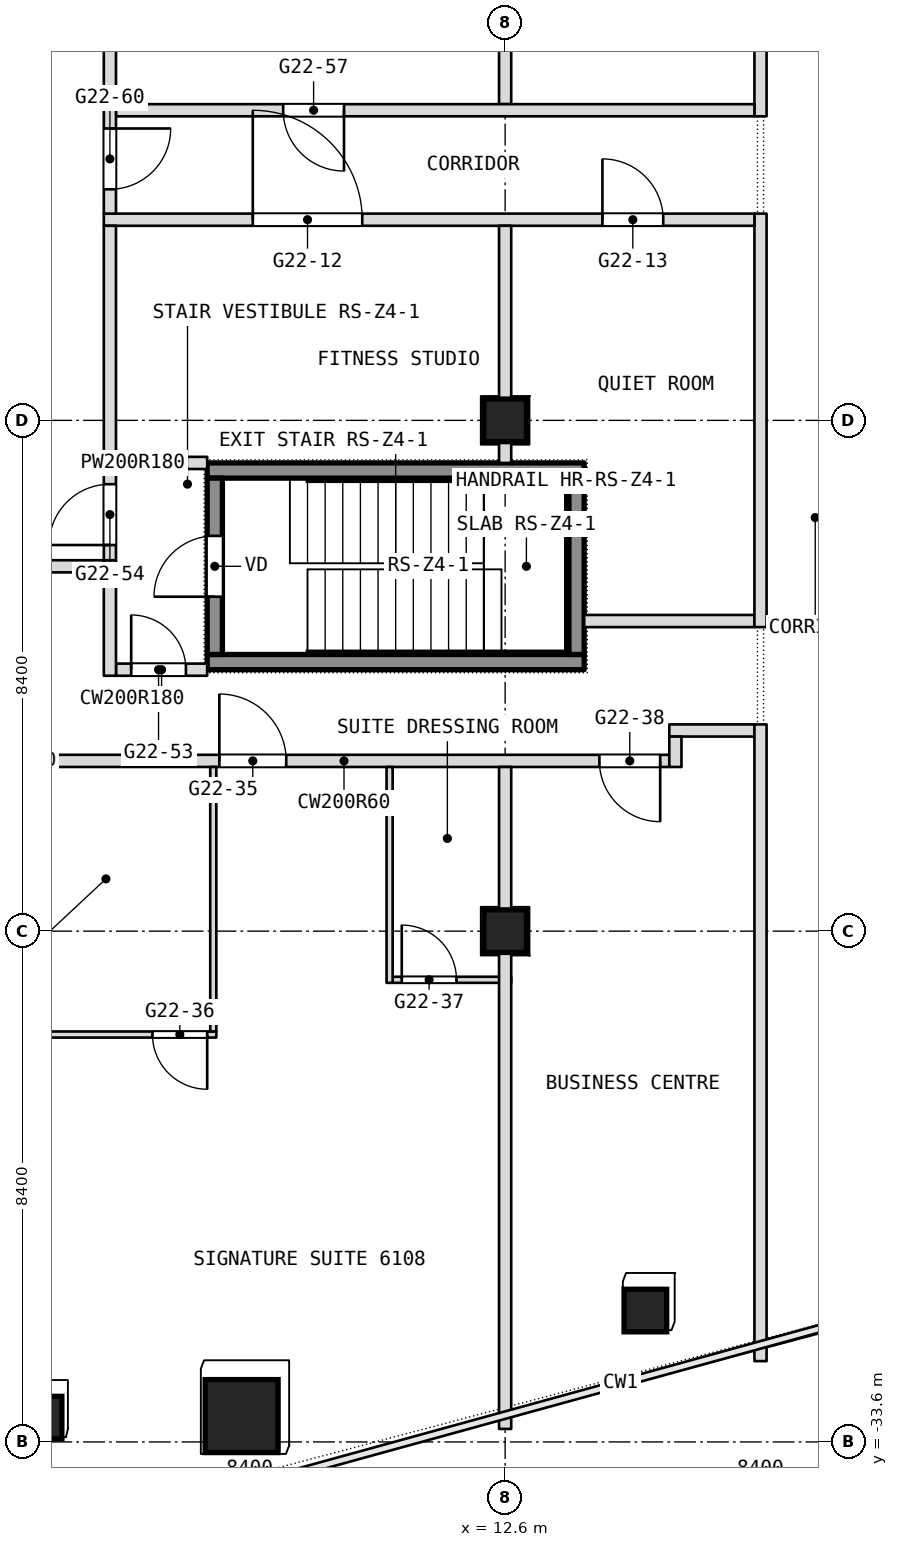
"""IFC4 building model, lengths in metres.
Left out: names, types, materials, properties, quantities, classifications, styles, units other than length and angle.
Written with IfcOpenShell. Run it as: python <this file> out.ifc"""

import sys

from ifc_helpers import new_model, si_unit, direction, frame, frame_2d, origin, origin_2d, place, context, subcontext, project, spatial, rectangle, extrude, element, fill, save


model = new_model("IFC4")
c1 = context("Model", 3, precision=1e-05, world=origin(), true_north=direction((0.0, 1.0)))
c2 = subcontext(c1, "Body", "Model", "MODEL_VIEW")
j1 = project(units=[si_unit("LENGTHUNIT", "METRE"), si_unit("PLANEANGLEUNIT", "RADIAN")], contexts=[c1])
p1 = place(None, origin())
s1 = spatial("IfcSite", under=j1, at=p1, CompositionType="ELEMENT")
p2 = place(p1, origin())
s2 = spatial("IfcBuilding", under=s1, at=p2, CompositionType="ELEMENT")
p3 = place(p2, frame((0.0, 0.0, 266.9)))
s3 = spatial("IfcBuildingStorey", under=s2, at=p3, CompositionType="ELEMENT", Elevation=266.9)
p4 = place(p3, frame((8.266, -33.175, 0.0), z_axis=(0.0, 0.0, 1.0), x_axis=(1.0, 0.0, 0.0)))
e1 = element("IfcColumn", 1, at=p4, inside=s3, PredefinedType="COLUMN", context=c2, shape_type="SweptSolid", body=[
    extrude(rectangle(XDim=1.2, YDim=1.2, at=origin_2d()), origin(), (0.0, 0.0, 1.0), 3.6),
])
for number, where, z_axis, x_axis in (
    (2, (12.6, -25.2, 0.0), (0.0, 0.0, 1.0), (1.0, 0.0, 0.0)),
    (3, (12.6, -16.8, 0.0), (0.0, 0.0, 1.0), (1.0, 0.0, 0.0)),
    (4, (14.907, -31.439, 0.0), (0.0, 0.0, 1.0), (1.0, 0.0, 0.0)),
    (5, (4.96, -33.2, 0.0), (0.0, 0.0, 1.0), (1.0, 0.0, 0.0)),
):
    element("IfcColumn", number, at=place(p3, frame(where, z_axis=z_axis, x_axis=x_axis)), inside=s3, PredefinedType="COLUMN", context=c2, shape_type="SweptSolid", body=[
        extrude(rectangle(XDim=0.7, YDim=0.7, at=origin_2d()), origin(), (0.0, 0.0, 1.0), 3.6),
    ])
p5 = place(p3, frame((4.3, -26.9, 0.0), z_axis=(0.0, 0.0, 1.0), x_axis=(1.0, 0.0, 0.0)))
e6 = element("IfcWall", 6, at=p5, inside=s3, PredefinedType="PARTITIONING", context=c2, shape_type="SweptSolid", body=[
    extrude(rectangle(XDim=3.55, YDim=0.1, at=frame_2d((1.775, 0.0))), origin(), (0.0, 0.0, 1.0), 3.34),
])
p6 = place(p5, frame((2.5, 0.0, 0.0)))
e7 = element("IfcOpeningElement", 7, at=p6, cuts=e6, PredefinedType="OPENING", context=c2, shape_type="SweptSolid", body=[
    extrude(rectangle(XDim=0.9, YDim=2.1, at=frame_2d((0.45, 1.05))), frame((0.0, 0.05, 0.0), z_axis=(0.0, -1.0, 0.0), x_axis=(1.0, 0.0, 0.0)), (0.0, 0.0, 1.0), 0.1),
])
p7 = place(p3, frame((10.75, -26.0, 0.0), z_axis=(0.0, 0.0, 1.0), x_axis=(1.0, 0.0, 0.0)))
e8 = element("IfcWall", 8, at=p7, inside=s3, PredefinedType="PARTITIONING", context=c2, shape_type="SweptSolid", body=[
    extrude(rectangle(XDim=1.95, YDim=0.1, at=frame_2d((0.975, 0.0))), origin(), (0.0, 0.0, 1.0), 3.34),
])
p8 = place(p7, frame((0.15, 0.0, 0.0)))
e9 = element("IfcOpeningElement", 9, at=p8, cuts=e8, PredefinedType="OPENING", context=c2, shape_type="SweptSolid", body=[
    extrude(rectangle(XDim=0.9, YDim=2.1, at=frame_2d((0.45, 1.05))), frame((0.0, 0.05, 0.0), z_axis=(0.0, -1.0, 0.0), x_axis=(1.0, 0.0, 0.0)), (0.0, 0.0, 1.0), 0.1),
])
p9 = place(p3, frame((4.6, -22.4, 0.0), z_axis=(0.0, 0.0, 1.0), x_axis=(1.0, 0.0, 0.0)))
e10 = element("IfcWall", 10, at=p9, inside=s3, PredefinedType="PARTITIONING", context=c2, shape_type="SweptSolid", body=[
    extrude(rectangle(XDim=10.7, YDim=0.2, at=frame_2d((5.35, 0.0))), origin(), (0.0, 0.0, 1.0), 3.34),
])
p10 = place(p9, frame((3.3, 0.0, 0.0)))
e11 = element("IfcOpeningElement", 11, at=p10, cuts=e10, PredefinedType="OPENING", context=c2, shape_type="SweptSolid", body=[
    extrude(rectangle(XDim=1.1, YDim=2.1, at=frame_2d((0.55, 1.05))), frame((0.0, 0.1, 0.0), z_axis=(0.0, -1.0, 0.0), x_axis=(1.0, 0.0, 0.0)), (0.0, 0.0, 1.0), 0.2),
])
p11 = place(p9, frame((9.55, 0.0, 0.0)))
e12 = element("IfcOpeningElement", 12, at=p11, cuts=e10, PredefinedType="OPENING", context=c2, shape_type="SweptSolid", body=[
    extrude(rectangle(XDim=1.0, YDim=2.1, at=frame_2d((0.5, 1.05))), frame((0.0, 0.1, 0.0), z_axis=(0.0, -1.0, 0.0), x_axis=(1.0, 0.0, 0.0)), (0.0, 0.0, 1.0), 0.2),
])
p12 = place(p3, frame((15.3, -21.9, 0.0), z_axis=(0.0, 0.0, 1.0), x_axis=(1.0, 0.0, 0.0)))
e13 = element("IfcWall", 13, at=p12, inside=s3, PredefinedType="PARTITIONING", context=c2, shape_type="SweptSolid", body=[
    extrude(rectangle(XDim=1.4, YDim=0.2, at=frame_2d((0.7, 0.0))), origin(), (0.0, 0.0, 1.0), 3.34),
])
p13 = place(p3, frame((6.2, -20.9, 0.0), z_axis=(0.0, 0.0, 1.0), x_axis=(1.0, 0.0, 0.0)))
e14 = element("IfcWall", 14, at=p13, inside=s3, PredefinedType="PARTITIONING", context=c2, shape_type="SweptSolid", body=[
    extrude(rectangle(XDim=1.5, YDim=0.2, at=frame_2d((0.75, 0.0))), origin(), (0.0, 0.0, 1.0), 3.34),
])
p14 = place(p13, frame((0.25, 0.0, 0.0)))
e15 = element("IfcOpeningElement", 15, at=p14, cuts=e14, PredefinedType="OPENING", context=c2, shape_type="SweptSolid", body=[
    extrude(rectangle(XDim=0.9, YDim=2.1, at=frame_2d((0.45, 1.05))), frame((0.0, 0.1, 0.0), z_axis=(0.0, -1.0, 0.0), x_axis=(1.0, 0.0, 0.0)), (0.0, 0.0, 1.0), 0.2),
])
p15 = place(p3, frame((13.9, -20.1, 0.0), z_axis=(0.0, 0.0, 1.0), x_axis=(1.0, 0.0, 0.0)))
e16 = element("IfcWall", 16, at=p15, inside=s3, PredefinedType="PARTITIONING", context=c2, shape_type="SweptSolid", body=[
    extrude(rectangle(XDim=2.8, YDim=0.2, at=frame_2d((1.4, 0.0))), origin(), (0.0, 0.0, 1.0), 3.34),
])
p16 = place(p3, frame((4.6, -19.2, 0.0), z_axis=(0.0, 0.0, 1.0), x_axis=(1.0, 0.0, 0.0)))
e17 = element("IfcWall", 17, at=p16, inside=s3, PredefinedType="PARTITIONING", context=c2, shape_type="SweptSolid", body=[
    extrude(rectangle(XDim=1.4, YDim=0.2, at=frame_2d((0.7, 0.0))), origin(), (0.0, 0.0, 1.0), 3.34),
])
p17 = place(p3, frame((6.0, -17.5, 0.0), z_axis=(0.0, 0.0, 1.0), x_axis=(1.0, 0.0, 0.0)))
e18 = element("IfcWall", 18, at=p17, inside=s3, PredefinedType="PARTITIONING", context=c2, shape_type="SweptSolid", body=[
    extrude(rectangle(XDim=1.7, YDim=0.2, at=frame_2d((0.85, 0.0))), origin(), (0.0, 0.0, 1.0), 3.34),
])
p18 = place(p3, frame((16.8, -32.271, 0.0), z_axis=(0.0, 0.0, 1.0), x_axis=(0.0, 1.0, 0.0)))
e19 = element("IfcWall", 19, at=p18, inside=s3, PredefinedType="PARTITIONING", context=c2, shape_type="SweptSolid", body=[
    extrude(rectangle(XDim=10.471, YDim=0.2, at=frame_2d((5.235, 0.0))), origin(), (0.0, 0.0, 1.0), 3.34),
])
p19 = place(p3, frame((16.8, -20.2, 0.0), z_axis=(0.0, 0.0, 1.0), x_axis=(0.0, 1.0, 0.0)))
e20 = element("IfcWall", 20, at=p19, inside=s3, PredefinedType="PARTITIONING", context=c2, shape_type="SweptSolid", body=[
    extrude(rectangle(XDim=6.8, YDim=0.2, at=frame_2d((3.4, 0.0))), origin(), (0.0, 0.0, 1.0), 3.34),
])
p20 = place(p3, frame((16.8, -11.8, 0.0), z_axis=(0.0, 0.0, 1.0), x_axis=(0.0, 1.0, 0.0)))
e21 = element("IfcWall", 21, at=p20, inside=s3, PredefinedType="PARTITIONING", context=c2, shape_type="SweptSolid", body=[
    extrude(rectangle(XDim=9.9, YDim=0.2, at=frame_2d((4.95, 0.0))), origin(), (0.0, 0.0, 1.0), 3.34),
])
p21 = place(p3, frame((15.4, -22.5, 0.0), z_axis=(0.0, 0.0, 1.0), x_axis=(0.0, 1.0, 0.0)))
e22 = element("IfcWall", 22, at=p21, inside=s3, PredefinedType="PARTITIONING", context=c2, shape_type="SweptSolid", body=[
    extrude(rectangle(XDim=0.5, YDim=0.2, at=frame_2d((0.25, 0.0))), origin(), (0.0, 0.0, 1.0), 3.34),
])
p22 = place(p3, frame((6.0, -13.5, 0.0), z_axis=(0.0, 0.0, 1.0), x_axis=(1.0, 0.0, 0.0)))
e23 = element("IfcWall", 23, at=p22, inside=s3, PredefinedType="PARTITIONING", context=c2, shape_type="SweptSolid", body=[
    extrude(rectangle(XDim=10.7, YDim=0.2, at=frame_2d((5.35, 0.0))), origin(), (0.0, 0.0, 1.0), 3.34),
])
p23 = place(p22, frame((2.45, 0.0, 0.0)))
e24 = element("IfcOpeningElement", 24, at=p23, cuts=e23, PredefinedType="OPENING", context=c2, shape_type="SweptSolid", body=[
    extrude(rectangle(XDim=1.8, YDim=2.1, at=frame_2d((0.9, 1.05))), frame((0.0, 0.1, 0.0), z_axis=(0.0, -1.0, 0.0), x_axis=(1.0, 0.0, 0.0)), (0.0, 0.0, 1.0), 0.2),
])
p24 = place(p22, frame((8.2, 0.0, 0.0)))
e25 = element("IfcOpeningElement", 25, at=p24, cuts=e23, PredefinedType="OPENING", context=c2, shape_type="SweptSolid", body=[
    extrude(rectangle(XDim=1.0, YDim=2.1, at=frame_2d((0.5, 1.05))), frame((0.0, 0.1, 0.0), z_axis=(0.0, -1.0, 0.0), x_axis=(1.0, 0.0, 0.0)), (0.0, 0.0, 1.0), 0.2),
])
p25 = place(p3, frame((12.6, -33.386, 0.0), z_axis=(0.0, 0.0, 1.0), x_axis=(0.0, 1.0, 0.0)))
e26 = element("IfcWall", 26, at=p25, inside=s3, PredefinedType="PARTITIONING", context=c2, shape_type="SweptSolid", body=[
    extrude(rectangle(XDim=10.886, YDim=0.2, at=frame_2d((5.443, 0.0))), origin(), (0.0, 0.0, 1.0), 3.34),
])
p26 = place(p3, frame((12.6, -17.5, 0.0), z_axis=(0.0, 0.0, 1.0), x_axis=(0.0, 1.0, 0.0)))
e27 = element("IfcWall", 27, at=p26, inside=s3, PredefinedType="PARTITIONING", context=c2, shape_type="SweptSolid", body=[
    extrude(rectangle(XDim=3.9, YDim=0.2, at=frame_2d((1.95, 0.0))), origin(), (0.0, 0.0, 1.0), 3.34),
])
p27 = place(p3, frame((12.6, -11.6, 0.0), z_axis=(0.0, 0.0, 1.0), x_axis=(0.0, 1.0, 0.0)))
e28 = element("IfcWall", 28, at=p27, inside=s3, PredefinedType="PARTITIONING", context=c2, shape_type="SweptSolid", body=[
    extrude(rectangle(XDim=9.9, YDim=0.2, at=frame_2d((4.95, 0.0))), origin(), (0.0, 0.0, 1.0), 3.34),
])
p28 = place(p3, frame((6.2, -11.7, 0.0), z_axis=(0.0, 0.0, 1.0), x_axis=(1.0, 0.0, 0.0)))
e29 = element("IfcWall", 29, at=p28, inside=s3, PredefinedType="PARTITIONING", context=c2, shape_type="SweptSolid", body=[
    extrude(rectangle(XDim=10.5, YDim=0.2, at=frame_2d((5.25, 0.0))), origin(), (0.0, 0.0, 1.0), 3.34),
])
p29 = place(p28, frame((2.75, 0.0, 0.0)))
e30 = element("IfcOpeningElement", 30, at=p29, cuts=e29, PredefinedType="OPENING", context=c2, shape_type="SweptSolid", body=[
    extrude(rectangle(XDim=1.0, YDim=2.1, at=frame_2d((0.5, 1.05))), frame((0.0, 0.1, 0.0), z_axis=(0.0, -1.0, 0.0), x_axis=(1.0, 0.0, 0.0)), (0.0, 0.0, 1.0), 0.2),
])
p30 = place(p3, frame((10.7, -26.05, 0.0), z_axis=(0.0, 0.0, 1.0), x_axis=(0.0, 1.0, 0.0)))
e31 = element("IfcWall", 31, at=p30, inside=s3, PredefinedType="PARTITIONING", context=c2, shape_type="SweptSolid", body=[
    extrude(rectangle(XDim=3.55, YDim=0.1, at=frame_2d((1.775, 0.0))), origin(), (0.0, 0.0, 1.0), 3.34),
])
p31 = place(p3, frame((7.8, -26.85, 0.0), z_axis=(0.0, 0.0, 1.0), x_axis=(0.0, 1.0, 0.0)))
e32 = element("IfcWall", 32, at=p31, inside=s3, PredefinedType="PARTITIONING", context=c2, shape_type="SweptSolid", body=[
    extrude(rectangle(XDim=4.35, YDim=0.1, at=frame_2d((2.175, 0.0))), origin(), (0.0, 0.0, 1.0), 3.34),
])
p32 = place(p3, frame((6.1, -21.0, 0.0), z_axis=(0.0, 0.0, 1.0), x_axis=(0.0, 1.0, 0.0)))
e33 = element("IfcWall", 33, at=p32, inside=s3, PredefinedType="PARTITIONING", context=c2, shape_type="SweptSolid", body=[
    extrude(rectangle(XDim=1.9, YDim=0.2, at=frame_2d((0.95, 0.0))), origin(), (0.0, 0.0, 1.0), 3.34),
])
p33 = place(p3, frame((6.1, -13.4, 0.0), z_axis=(0.0, 0.0, 1.0), x_axis=(0.0, 1.0, 0.0)))
e34 = element("IfcWall", 34, at=p33, inside=s3, PredefinedType="PARTITIONING", context=c2, shape_type="SweptSolid", body=[
    extrude(rectangle(XDim=1.8, YDim=0.2, at=frame_2d((0.9, 0.0))), origin(), (0.0, 0.0, 1.0), 3.34),
])
p34 = place(p33, frame((0.4, 0.0, 0.0)))
e35 = element("IfcOpeningElement", 35, at=p34, cuts=e34, PredefinedType="OPENING", context=c2, shape_type="SweptSolid", body=[
    extrude(rectangle(XDim=1.0, YDim=2.1, at=frame_2d((0.5, 1.05))), frame((0.0, 0.1, 0.0), z_axis=(0.0, -1.0, 0.0), x_axis=(1.0, 0.0, 0.0)), (0.0, 0.0, 1.0), 0.2),
])
p35 = place(p3, frame((6.1, -19.1, 0.0), z_axis=(0.0, 0.0, 1.0), x_axis=(0.0, 1.0, 0.0)))
e36 = element("IfcWall", 36, at=p35, inside=s3, PredefinedType="PARTITIONING", context=c2, shape_type="SweptSolid", body=[
    extrude(rectangle(XDim=5.5, YDim=0.2, at=frame_2d((2.75, 0.0))), origin(), (0.0, 0.0, 1.0), 3.34),
])
p36 = place(p35, frame((0.25, 0.0, 0.0)))
e37 = element("IfcOpeningElement", 37, at=p36, cuts=e36, PredefinedType="OPENING", context=c2, shape_type="SweptSolid", body=[
    extrude(rectangle(XDim=1.0, YDim=2.1, at=frame_2d((0.5, 1.05))), frame((0.0, 0.1, 0.0), z_axis=(0.0, -1.0, 0.0), x_axis=(1.0, 0.0, 0.0)), (0.0, 0.0, 1.0), 0.2),
])
p37 = place(p3, frame((6.1, -11.6, 0.0), z_axis=(0.0, 0.0, 1.0), x_axis=(0.0, 1.0, 0.0)))
e38 = element("IfcWall", 38, at=p37, inside=s3, PredefinedType="PARTITIONING", context=c2, shape_type="SweptSolid", body=[
    extrude(rectangle(XDim=9.9, YDim=0.2, at=frame_2d((4.95, 0.0))), origin(), (0.0, 0.0, 1.0), 3.34),
])
for number, where, z_axis, x_axis in (
    (39, (7.7, -20.775, -0.26), (0.0, 0.0, 1.0), (1.0, 0.0, 0.0)),
    (40, (7.7, -17.625, -0.26), (0.0, 0.0, 1.0), (1.0, 0.0, 0.0)),
):
    element("IfcWall", number, at=place(p3, frame(where, z_axis=z_axis, x_axis=x_axis)), inside=s3, PredefinedType="SHEAR", context=c2, shape_type="SweptSolid", body=[
        extrude(rectangle(XDim=6.2, YDim=0.25, at=frame_2d((3.1, 0.0))), origin(), (0.0, 0.0, 1.0), 3.96),
    ])
p38 = place(p3, frame((7.825, -20.65, -0.26), z_axis=(0.0, 0.0, 1.0), x_axis=(0.0, 1.0, 0.0)))
e41 = element("IfcWall", 41, at=p38, inside=s3, PredefinedType="SHEAR", context=c2, shape_type="SweptSolid", body=[
    extrude(rectangle(XDim=2.9, YDim=0.25, at=frame_2d((1.45, 0.0))), origin(), (0.0, 0.0, 1.0), 3.96),
])
p39 = place(p38, frame((0.95, 0.0, 0.0)))
e42 = element("IfcOpeningElement", 42, at=p39, cuts=e41, PredefinedType="OPENING", context=c2, shape_type="SweptSolid", body=[
    extrude(rectangle(XDim=1.0, YDim=2.1, at=frame_2d((0.5, 1.05))), frame((0.0, 0.125, 0.0), z_axis=(0.0, -1.0, 0.0), x_axis=(1.0, 0.0, 0.0)), (0.0, 0.0, 1.0), 0.25),
])
p40 = place(p3, frame((13.775, -20.65, -0.26), z_axis=(0.0, 0.0, 1.0), x_axis=(0.0, 1.0, 0.0)))
e43 = element("IfcWall", 43, at=p40, inside=s3, PredefinedType="SHEAR", context=c2, shape_type="SweptSolid", body=[
    extrude(rectangle(XDim=2.9, YDim=0.25, at=frame_2d((1.45, 0.0))), origin(), (0.0, 0.0, 1.0), 3.96),
])
p41 = place(p6, origin())
e44 = element("IfcDoor", 44, at=p41, inside=s3, OperationType="SINGLE_SWING_RIGHT", PredefinedType="DOOR", context=c2, shape_type="SweptSolid", body=[
    extrude(rectangle(XDim=0.9, YDim=2.1, at=frame_2d((0.45, 1.05))), frame((0.0, 0.025, 0.0), z_axis=(0.0, -1.0, 0.0), x_axis=(1.0, 0.0, 0.0)), (0.0, 0.0, 1.0), 0.05),
])
fill(e7, e44)
p42 = place(p8, origin())
e45 = element("IfcDoor", 45, at=p42, inside=s3, OperationType="SINGLE_SWING_LEFT", PredefinedType="DOOR", context=c2, shape_type="SweptSolid", body=[
    extrude(rectangle(XDim=0.9, YDim=2.1, at=frame_2d((0.45, 1.05))), frame((0.0, 0.025, 0.0), z_axis=(0.0, -1.0, 0.0), x_axis=(1.0, 0.0, 0.0)), (0.0, 0.0, 1.0), 0.05),
])
fill(e9, e45)
p43 = place(p10, origin())
e46 = element("IfcDoor", 46, at=p43, inside=s3, OperationType="SINGLE_SWING_RIGHT", PredefinedType="DOOR", context=c2, shape_type="SweptSolid", body=[
    extrude(rectangle(XDim=1.1, YDim=2.1, at=frame_2d((0.55, 1.05))), frame((0.0, 0.025, 0.0), z_axis=(0.0, -1.0, 0.0), x_axis=(1.0, 0.0, 0.0)), (0.0, 0.0, 1.0), 0.05),
])
fill(e11, e46)
p44 = place(p11, origin())
e47 = element("IfcDoor", 47, at=p44, inside=s3, OperationType="SINGLE_SWING_RIGHT", PredefinedType="DOOR", context=c2, shape_type="SweptSolid", body=[
    extrude(rectangle(XDim=1.0, YDim=2.1, at=frame_2d((0.5, 1.05))), frame((0.0, 0.025, 0.0), z_axis=(0.0, -1.0, 0.0), x_axis=(1.0, 0.0, 0.0)), (0.0, 0.0, 1.0), 0.05),
])
fill(e12, e47)
p45 = place(p14, origin())
e48 = element("IfcDoor", 48, at=p45, inside=s3, OperationType="SINGLE_SWING_LEFT", PredefinedType="DOOR", context=c2, shape_type="SweptSolid", body=[
    extrude(rectangle(XDim=0.9, YDim=2.1, at=frame_2d((0.45, 1.05))), frame((0.0, 0.025, 0.0), z_axis=(0.0, -1.0, 0.0), x_axis=(1.0, 0.0, 0.0)), (0.0, 0.0, 1.0), 0.05),
])
fill(e15, e48)
p46 = place(p23, origin())
e49 = element("IfcDoor", 49, at=p46, inside=s3, OperationType="DOUBLE_DOOR_SINGLE_SWING", PredefinedType="DOOR", context=c2, shape_type="SweptSolid", body=[
    extrude(rectangle(XDim=1.8, YDim=2.1, at=frame_2d((0.9, 1.05))), frame((0.0, 0.025, 0.0), z_axis=(0.0, -1.0, 0.0), x_axis=(1.0, 0.0, 0.0)), (0.0, 0.0, 1.0), 0.05),
])
fill(e24, e49)
p47 = place(p24, origin())
e50 = element("IfcDoor", 50, at=p47, inside=s3, OperationType="SINGLE_SWING_RIGHT", PredefinedType="DOOR", context=c2, shape_type="SweptSolid", body=[
    extrude(rectangle(XDim=1.0, YDim=2.1, at=frame_2d((0.5, 1.05))), frame((0.0, 0.025, 0.0), z_axis=(0.0, -1.0, 0.0), x_axis=(1.0, 0.0, 0.0)), (0.0, 0.0, 1.0), 0.05),
])
fill(e25, e50)
p48 = place(p29, origin())
e51 = element("IfcDoor", 51, at=p48, inside=s3, OperationType="SINGLE_SWING_LEFT", PredefinedType="DOOR", context=c2, shape_type="SweptSolid", body=[
    extrude(rectangle(XDim=1.0, YDim=2.1, at=frame_2d((0.5, 1.05))), frame((0.0, 0.025, 0.0), z_axis=(0.0, -1.0, 0.0), x_axis=(1.0, 0.0, 0.0)), (0.0, 0.0, 1.0), 0.05),
])
fill(e30, e51)
p49 = place(p34, origin())
e52 = element("IfcDoor", 52, at=p49, inside=s3, OperationType="SINGLE_SWING_RIGHT", PredefinedType="DOOR", context=c2, shape_type="SweptSolid", body=[
    extrude(rectangle(XDim=1.0, YDim=2.1, at=frame_2d((0.5, 1.05))), frame((0.0, 0.025, 0.0), z_axis=(0.0, -1.0, 0.0), x_axis=(1.0, 0.0, 0.0)), (0.0, 0.0, 1.0), 0.05),
])
fill(e35, e52)
p50 = place(p36, origin())
e53 = element("IfcDoor", 53, at=p50, inside=s3, OperationType="SINGLE_SWING_LEFT", PredefinedType="DOOR", context=c2, shape_type="SweptSolid", body=[
    extrude(rectangle(XDim=1.0, YDim=2.1, at=frame_2d((0.5, 1.05))), frame((0.0, 0.025, 0.0), z_axis=(0.0, -1.0, 0.0), x_axis=(1.0, 0.0, 0.0)), (0.0, 0.0, 1.0), 0.05),
])
fill(e37, e53)
p51 = place(p39, origin())
e54 = element("IfcDoor", 54, at=p51, inside=s3, OperationType="SINGLE_SWING_LEFT", PredefinedType="DOOR", context=c2, shape_type="SweptSolid", body=[
    extrude(rectangle(XDim=1.0, YDim=2.1, at=frame_2d((0.5, 1.05))), frame((0.0, 0.025, 0.0), z_axis=(0.0, -1.0, 0.0), x_axis=(1.0, 0.0, 0.0)), (0.0, 0.0, 1.0), 0.05),
])
fill(e42, e54)
save(model, sys.argv[1])
